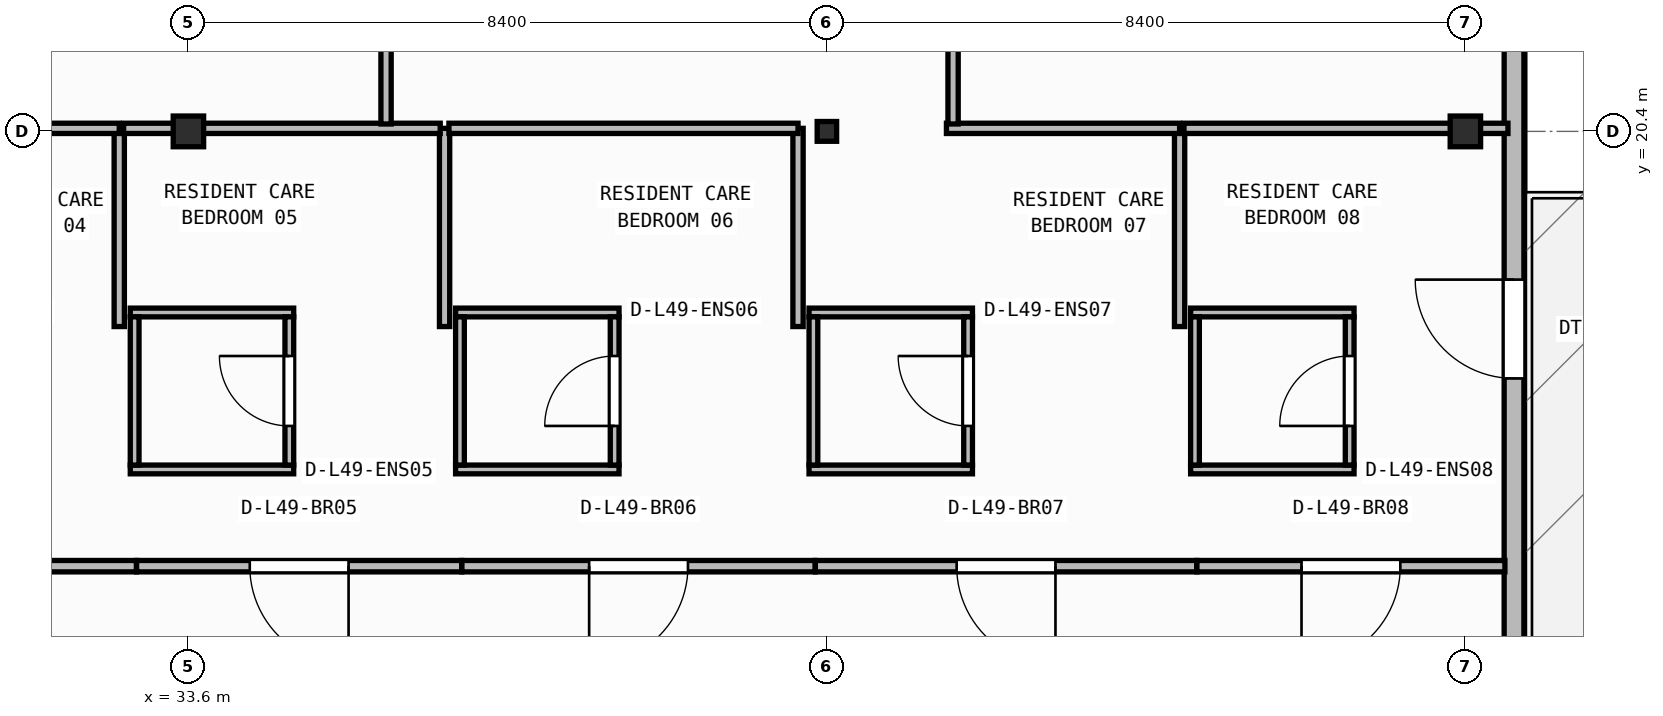
"""IFC4 building model, lengths in metres.
Left out: names, types, materials, properties, quantities, classifications, styles, units other than length and angle.
Written with IfcOpenShell. Run it as: python <this file> out.ifc"""

import sys

from ifc_helpers import new_model, si_unit, direction, frame, frame_2d, origin, origin_2d, place, context, subcontext, project, spatial, rectangle, i_section, extrude, element, fill, save


model = new_model("IFC4")
c1 = context("Model", 3, precision=1e-05, world=origin(), true_north=direction((0.0, 1.0)))
c2 = subcontext(c1, "Body", "Model", "MODEL_VIEW")
j1 = project(units=[si_unit("LENGTHUNIT", "METRE"), si_unit("PLANEANGLEUNIT", "RADIAN")], contexts=[c1])
p1 = place(None, origin())
s1 = spatial("IfcSite", under=j1, at=p1, CompositionType="ELEMENT")
p2 = place(p1, origin())
s2 = spatial("IfcBuilding", under=s1, at=p2, CompositionType="ELEMENT")
p3 = place(p2, frame((0.0, 0.0, 200.0)))
s3 = spatial("IfcBuildingStorey", under=s2, at=p3, CompositionType="ELEMENT", Elevation=200.0)
p4 = place(p3, frame((33.6, 20.4, 0.0), z_axis=(0.0, 0.0, 1.0), x_axis=(1.0, 0.0, 0.0)))
e1 = element("IfcColumn", 1, at=p4, inside=s3, PredefinedType="COLUMN", context=c2, shape_type="SweptSolid", body=[
    extrude(i_section(OverallWidth=0.4, OverallDepth=0.404, WebThickness=0.02, FlangeThickness=0.032, at=origin_2d()), origin(), (0.0, 0.0, 1.0), 3.95),
])
p5 = place(p3, frame((42.0, 20.4, 0.0), z_axis=(0.0, 0.0, 1.0), x_axis=(1.0, 0.0, 0.0)))
e2 = element("IfcColumn", 2, at=p5, inside=s3, PredefinedType="COLUMN", context=c2, shape_type="SweptSolid", body=[
    extrude(i_section(OverallWidth=0.256, OverallDepth=0.26, WebThickness=0.01, FlangeThickness=0.017, FilletRadius=0.013, at=origin_2d()), origin(), (0.0, 0.0, 1.0), 3.95),
])
p6 = place(p3, frame((50.4, 20.4, 0.0), z_axis=(0.0, 0.0, 1.0), x_axis=(1.0, 0.0, 0.0)))
e3 = element("IfcColumn", 3, at=p6, inside=s3, PredefinedType="COLUMN", context=c2, shape_type="SweptSolid", body=[
    extrude(i_section(OverallWidth=0.4, OverallDepth=0.404, WebThickness=0.02, FlangeThickness=0.032, at=origin_2d()), origin(), (0.0, 0.0, 1.0), 3.95),
])
p7 = place(p3, frame((51.04, 6.46, 0.0), z_axis=(0.0, 0.0, 1.0), x_axis=(0.0, 1.0, 0.0)))
e4 = element("IfcWall", 4, at=p7, inside=s3, PredefinedType="STANDARD", context=c2, shape_type="SweptSolid", body=[
    extrude(rectangle(XDim=22.68, YDim=0.26, at=frame_2d((11.34, 0.0))), origin(), (0.0, 0.0, 1.0), 3.71),
])
p8 = place(p7, frame((10.69, 0.0, 0.0)))
e5 = element("IfcOpeningElement", 5, at=p8, cuts=e4, PredefinedType="OPENING", context=c2, shape_type="SweptSolid", body=[
    extrude(rectangle(XDim=1.3, YDim=2.15, at=frame_2d((0.65, 1.075))), frame((0.0, 0.14, 0.0), z_axis=(0.0, -1.0, 0.0), x_axis=(1.0, 0.0, 0.0)), (0.0, 0.0, 1.0), 0.28),
])
p9 = place(p3, frame((32.835, 15.952, 0.0), z_axis=(0.0, 0.0, 1.0), x_axis=(1.0, 0.0, 0.0)))
e6 = element("IfcWall", 6, at=p9, inside=s3, PredefinedType="PARTITIONING", context=c2, shape_type="SweptSolid", body=[
    extrude(rectangle(XDim=2.15, YDim=0.115, at=frame_2d((1.075, 0.0))), origin(), (0.0, 0.0, 1.0), 3.429),
])
p10 = place(p3, frame((32.835, 18.018, 0.0), z_axis=(0.0, 0.0, 1.0), x_axis=(1.0, 0.0, 0.0)))
e7 = element("IfcWall", 7, at=p10, inside=s3, PredefinedType="PARTITIONING", context=c2, shape_type="SweptSolid", body=[
    extrude(rectangle(XDim=2.15, YDim=0.115, at=frame_2d((1.075, 0.0))), origin(), (0.0, 0.0, 1.0), 3.71),
])
p11 = place(p3, frame((32.893, 16.01, 0.0), z_axis=(0.0, 0.0, 1.0), x_axis=(0.0, 1.0, 0.0)))
e8 = element("IfcWall", 8, at=p11, inside=s3, PredefinedType="PARTITIONING", context=c2, shape_type="SweptSolid", body=[
    extrude(rectangle(XDim=1.95, YDim=0.115, at=frame_2d((0.975, 0.0))), origin(), (0.0, 0.0, 1.0), 3.71),
])
p12 = place(p3, frame((34.927, 16.01, 0.0), z_axis=(0.0, 0.0, 1.0), x_axis=(0.0, 1.0, 0.0)))
e9 = element("IfcWall", 9, at=p12, inside=s3, PredefinedType="PARTITIONING", context=c2, shape_type="SweptSolid", body=[
    extrude(rectangle(XDim=1.95, YDim=0.115, at=frame_2d((0.975, 0.0))), origin(), (0.0, 0.0, 1.0), 3.71),
])
p13 = place(p12, frame((0.515, 0.0, 0.0)))
e10 = element("IfcOpeningElement", 10, at=p13, cuts=e9, PredefinedType="OPENING", context=c2, shape_type="SweptSolid", body=[
    extrude(rectangle(XDim=0.92, YDim=2.1, at=frame_2d((0.46, 1.05))), frame((0.0, 0.067, 0.0), z_axis=(0.0, -1.0, 0.0), x_axis=(1.0, 0.0, 0.0)), (0.0, 0.0, 1.0), 0.135),
])
p14 = place(p3, frame((37.115, 15.952, 0.0), z_axis=(0.0, 0.0, 1.0), x_axis=(1.0, 0.0, 0.0)))
e11 = element("IfcWall", 11, at=p14, inside=s3, PredefinedType="PARTITIONING", context=c2, shape_type="SweptSolid", body=[
    extrude(rectangle(XDim=2.15, YDim=0.115, at=frame_2d((1.075, 0.0))), origin(), (0.0, 0.0, 1.0), 3.429),
])
p15 = place(p3, frame((37.115, 18.018, 0.0), z_axis=(0.0, 0.0, 1.0), x_axis=(1.0, 0.0, 0.0)))
e12 = element("IfcWall", 12, at=p15, inside=s3, PredefinedType="PARTITIONING", context=c2, shape_type="SweptSolid", body=[
    extrude(rectangle(XDim=2.15, YDim=0.115, at=frame_2d((1.075, 0.0))), origin(), (0.0, 0.0, 1.0), 3.71),
])
p16 = place(p3, frame((37.173, 16.01, 0.0), z_axis=(0.0, 0.0, 1.0), x_axis=(0.0, 1.0, 0.0)))
e13 = element("IfcWall", 13, at=p16, inside=s3, PredefinedType="PARTITIONING", context=c2, shape_type="SweptSolid", body=[
    extrude(rectangle(XDim=1.95, YDim=0.115, at=frame_2d((0.975, 0.0))), origin(), (0.0, 0.0, 1.0), 3.71),
])
p17 = place(p3, frame((39.208, 16.01, 0.0), z_axis=(0.0, 0.0, 1.0), x_axis=(0.0, 1.0, 0.0)))
e14 = element("IfcWall", 14, at=p17, inside=s3, PredefinedType="PARTITIONING", context=c2, shape_type="SweptSolid", body=[
    extrude(rectangle(XDim=1.95, YDim=0.115, at=frame_2d((0.975, 0.0))), origin(), (0.0, 0.0, 1.0), 3.71),
])
p18 = place(p17, frame((0.515, 0.0, 0.0)))
e15 = element("IfcOpeningElement", 15, at=p18, cuts=e14, PredefinedType="OPENING", context=c2, shape_type="SweptSolid", body=[
    extrude(rectangle(XDim=0.92, YDim=2.1, at=frame_2d((0.46, 1.05))), frame((0.0, 0.067, 0.0), z_axis=(0.0, -1.0, 0.0), x_axis=(1.0, 0.0, 0.0)), (0.0, 0.0, 1.0), 0.135),
])
p19 = place(p3, frame((41.765, 15.952, 0.0), z_axis=(0.0, 0.0, 1.0), x_axis=(1.0, 0.0, 0.0)))
e16 = element("IfcWall", 16, at=p19, inside=s3, PredefinedType="PARTITIONING", context=c2, shape_type="SweptSolid", body=[
    extrude(rectangle(XDim=2.15, YDim=0.115, at=frame_2d((1.075, 0.0))), origin(), (0.0, 0.0, 1.0), 3.429),
])
p20 = place(p3, frame((41.765, 18.018, 0.0), z_axis=(0.0, 0.0, 1.0), x_axis=(1.0, 0.0, 0.0)))
e17 = element("IfcWall", 17, at=p20, inside=s3, PredefinedType="PARTITIONING", context=c2, shape_type="SweptSolid", body=[
    extrude(rectangle(XDim=2.15, YDim=0.115, at=frame_2d((1.075, 0.0))), origin(), (0.0, 0.0, 1.0), 3.71),
])
p21 = place(p3, frame((41.823, 16.01, 0.0), z_axis=(0.0, 0.0, 1.0), x_axis=(0.0, 1.0, 0.0)))
e18 = element("IfcWall", 18, at=p21, inside=s3, PredefinedType="PARTITIONING", context=c2, shape_type="SweptSolid", body=[
    extrude(rectangle(XDim=1.95, YDim=0.115, at=frame_2d((0.975, 0.0))), origin(), (0.0, 0.0, 1.0), 3.157),
])
p22 = place(p3, frame((43.857, 16.01, 0.0), z_axis=(0.0, 0.0, 1.0), x_axis=(0.0, 1.0, 0.0)))
e19 = element("IfcWall", 19, at=p22, inside=s3, PredefinedType="PARTITIONING", context=c2, shape_type="SweptSolid", body=[
    extrude(rectangle(XDim=1.95, YDim=0.115, at=frame_2d((0.975, 0.0))), origin(), (0.0, 0.0, 1.0), 3.71),
])
p23 = place(p22, frame((0.515, 0.0, 0.0)))
e20 = element("IfcOpeningElement", 20, at=p23, cuts=e19, PredefinedType="OPENING", context=c2, shape_type="SweptSolid", body=[
    extrude(rectangle(XDim=0.92, YDim=2.1, at=frame_2d((0.46, 1.05))), frame((0.0, 0.067, 0.0), z_axis=(0.0, -1.0, 0.0), x_axis=(1.0, 0.0, 0.0)), (0.0, 0.0, 1.0), 0.135),
])
p24 = place(p3, frame((46.785, 15.952, 0.0), z_axis=(0.0, 0.0, 1.0), x_axis=(1.0, 0.0, 0.0)))
e21 = element("IfcWall", 21, at=p24, inside=s3, PredefinedType="PARTITIONING", context=c2, shape_type="SweptSolid", body=[
    extrude(rectangle(XDim=2.15, YDim=0.115, at=frame_2d((1.075, 0.0))), origin(), (0.0, 0.0, 1.0), 3.429),
])
p25 = place(p3, frame((46.785, 18.018, 0.0), z_axis=(0.0, 0.0, 1.0), x_axis=(1.0, 0.0, 0.0)))
e22 = element("IfcWall", 22, at=p25, inside=s3, PredefinedType="PARTITIONING", context=c2, shape_type="SweptSolid", body=[
    extrude(rectangle(XDim=2.15, YDim=0.115, at=frame_2d((1.075, 0.0))), origin(), (0.0, 0.0, 1.0), 3.71),
])
p26 = place(p3, frame((46.843, 16.01, 0.0), z_axis=(0.0, 0.0, 1.0), x_axis=(0.0, 1.0, 0.0)))
e23 = element("IfcWall", 23, at=p26, inside=s3, PredefinedType="PARTITIONING", context=c2, shape_type="SweptSolid", body=[
    extrude(rectangle(XDim=1.95, YDim=0.115, at=frame_2d((0.975, 0.0))), origin(), (0.0, 0.0, 1.0), 3.71),
])
p27 = place(p3, frame((48.877, 16.01, 0.0), z_axis=(0.0, 0.0, 1.0), x_axis=(0.0, 1.0, 0.0)))
e24 = element("IfcWall", 24, at=p27, inside=s3, PredefinedType="PARTITIONING", context=c2, shape_type="SweptSolid", body=[
    extrude(rectangle(XDim=1.95, YDim=0.115, at=frame_2d((0.975, 0.0))), origin(), (0.0, 0.0, 1.0), 3.71),
])
p28 = place(p27, frame((0.515, 0.0, 0.0)))
e25 = element("IfcOpeningElement", 25, at=p28, cuts=e24, PredefinedType="OPENING", context=c2, shape_type="SweptSolid", body=[
    extrude(rectangle(XDim=0.92, YDim=2.1, at=frame_2d((0.46, 1.05))), frame((0.0, 0.067, 0.0), z_axis=(0.0, -1.0, 0.0), x_axis=(1.0, 0.0, 0.0)), (0.0, 0.0, 1.0), 0.135),
])
p29 = place(p3, frame((32.916, 14.68, 0.0), z_axis=(0.0, 0.0, 1.0), x_axis=(-1.0, 0.0, 0.0)))
e26 = element("IfcWall", 26, at=p29, inside=s3, PredefinedType="PARTITIONING", context=c2, shape_type="SweptSolid", body=[
    extrude(rectangle(XDim=5.018, YDim=0.15, at=frame_2d((2.509, 0.0))), origin(), (0.0, 0.0, 1.0), 3.71),
])
p30 = place(p29, frame((1.859, 0.0, 0.0)))
e27 = element("IfcOpeningElement", 27, at=p30, cuts=e26, PredefinedType="OPENING", context=c2, shape_type="SweptSolid", body=[
    extrude(rectangle(XDim=1.3, YDim=2.15, at=frame_2d((0.65, 1.075))), frame((0.0, 0.085, 0.0), z_axis=(0.0, -1.0, 0.0), x_axis=(1.0, 0.0, 0.0)), (0.0, 0.0, 1.0), 0.17),
])
p31 = place(p3, frame((37.196, 14.68, 0.0), z_axis=(0.0, 0.0, 1.0), x_axis=(-1.0, 0.0, 0.0)))
e28 = element("IfcWall", 28, at=p31, inside=s3, PredefinedType="PARTITIONING", context=c2, shape_type="SweptSolid", body=[
    extrude(rectangle(XDim=4.278, YDim=0.15, at=frame_2d((2.139, 0.0))), origin(), (0.0, 0.0, 1.0), 3.71),
])
p32 = place(p31, frame((1.489, 0.0, 0.0)))
e29 = element("IfcOpeningElement", 29, at=p32, cuts=e28, PredefinedType="OPENING", context=c2, shape_type="SweptSolid", body=[
    extrude(rectangle(XDim=1.3, YDim=2.15, at=frame_2d((0.65, 1.075))), frame((0.0, 0.085, 0.0), z_axis=(0.0, -1.0, 0.0), x_axis=(1.0, 0.0, 0.0)), (0.0, 0.0, 1.0), 0.17),
])
p33 = place(p3, frame((41.846, 14.68, 0.0), z_axis=(0.0, 0.0, 1.0), x_axis=(-1.0, 0.0, 0.0)))
e30 = element("IfcWall", 30, at=p33, inside=s3, PredefinedType="PARTITIONING", context=c2, shape_type="SweptSolid", body=[
    extrude(rectangle(XDim=4.648, YDim=0.15, at=frame_2d((2.324, 0.0))), origin(), (0.0, 0.0, 1.0), 3.71),
])
p34 = place(p33, frame((1.674, 0.0, 0.0)))
e31 = element("IfcOpeningElement", 31, at=p34, cuts=e30, PredefinedType="OPENING", context=c2, shape_type="SweptSolid", body=[
    extrude(rectangle(XDim=1.3, YDim=2.15, at=frame_2d((0.65, 1.075))), frame((0.0, 0.085, 0.0), z_axis=(0.0, -1.0, 0.0), x_axis=(1.0, 0.0, 0.0)), (0.0, 0.0, 1.0), 0.17),
])
p35 = place(p3, frame((46.866, 14.68, 0.0), z_axis=(0.0, 0.0, 1.0), x_axis=(-1.0, 0.0, 0.0)))
e32 = element("IfcWall", 32, at=p35, inside=s3, PredefinedType="PARTITIONING", context=c2, shape_type="SweptSolid", body=[
    extrude(rectangle(XDim=5.018, YDim=0.15, at=frame_2d((2.509, 0.0))), origin(), (0.0, 0.0, 1.0), 3.71),
])
p36 = place(p35, frame((1.859, 0.0, 0.0)))
e33 = element("IfcOpeningElement", 33, at=p36, cuts=e32, PredefinedType="OPENING", context=c2, shape_type="SweptSolid", body=[
    extrude(rectangle(XDim=1.3, YDim=2.15, at=frame_2d((0.65, 1.075))), frame((0.0, 0.085, 0.0), z_axis=(0.0, -1.0, 0.0), x_axis=(1.0, 0.0, 0.0)), (0.0, 0.0, 1.0), 0.17),
])
p37 = place(p3, frame((50.92, 14.68, 0.0), z_axis=(0.0, 0.0, 1.0), x_axis=(-1.0, 0.0, 0.0)))
e34 = element("IfcWall", 34, at=p37, inside=s3, PredefinedType="PARTITIONING", context=c2, shape_type="SweptSolid", body=[
    extrude(rectangle(XDim=4.052, YDim=0.15, at=frame_2d((2.026, 0.0))), origin(), (0.0, 0.0, 1.0), 3.71),
])
p38 = place(p37, frame((1.376, 0.0, 0.0)))
e35 = element("IfcOpeningElement", 35, at=p38, cuts=e34, PredefinedType="OPENING", context=c2, shape_type="SweptSolid", body=[
    extrude(rectangle(XDim=1.3, YDim=2.15, at=frame_2d((0.65, 1.075))), frame((0.0, 0.085, 0.0), z_axis=(0.0, -1.0, 0.0), x_axis=(1.0, 0.0, 0.0)), (0.0, 0.0, 1.0), 0.17),
])
p39 = place(p3, frame((32.69, 17.833, 0.0), z_axis=(0.0, 0.0, 1.0), x_axis=(0.0, 1.0, 0.0)))
e36 = element("IfcWall", 36, at=p39, inside=s3, PredefinedType="PARTITIONING", context=c2, shape_type="SweptSolid", body=[
    extrude(rectangle(XDim=2.607, YDim=0.135, at=frame_2d((1.304, 0.0))), origin(), (0.0, 0.0, 1.0), 3.71),
])
p40 = place(p3, frame((32.69, 20.44, 0.0), z_axis=(0.0, 0.0, 1.0), x_axis=(-1.0, 0.0, 0.0)))
e37 = element("IfcWall", 37, at=p40, inside=s3, PredefinedType="PARTITIONING", context=c2, shape_type="SweptSolid", body=[
    extrude(rectangle(XDim=4.962, YDim=0.135, at=frame_2d((2.481, 0.0))), origin(), (0.0, 0.0, 1.0), 3.152),
])
p41 = place(p3, frame((36.97, 17.833, 0.0), z_axis=(0.0, 0.0, 1.0), x_axis=(0.0, 1.0, 0.0)))
e38 = element("IfcWall", 38, at=p41, inside=s3, PredefinedType="PARTITIONING", context=c2, shape_type="SweptSolid", body=[
    extrude(rectangle(XDim=2.607, YDim=0.135, at=frame_2d((1.304, 0.0))), origin(), (0.0, 0.0, 1.0), 3.71),
])
p42 = place(p3, frame((36.913, 20.44, 0.0), z_axis=(0.0, 0.0, 1.0), x_axis=(-1.0, 0.0, 0.0)))
e39 = element("IfcWall", 39, at=p42, inside=s3, PredefinedType="PARTITIONING", context=c2, shape_type="SweptSolid", body=[
    extrude(rectangle(XDim=4.165, YDim=0.135, at=frame_2d((2.083, 0.0))), origin(), (0.0, 0.0, 1.0), 3.152),
])
p43 = place(p3, frame((41.62, 17.833, 0.0), z_axis=(0.0, 0.0, 1.0), x_axis=(0.0, 1.0, 0.0)))
e40 = element("IfcWall", 40, at=p43, inside=s3, PredefinedType="PARTITIONING", context=c2, shape_type="SweptSolid", body=[
    extrude(rectangle(XDim=2.607, YDim=0.135, at=frame_2d((1.304, 0.0))), origin(), (0.0, 0.0, 1.0), 3.157),
])
p44 = place(p3, frame((41.62, 20.44, 0.0), z_axis=(0.0, 0.0, 1.0), x_axis=(-1.0, 0.0, 0.0)))
e41 = element("IfcWall", 41, at=p44, inside=s3, PredefinedType="PARTITIONING", context=c2, shape_type="SweptSolid", body=[
    extrude(rectangle(XDim=4.593, YDim=0.135, at=frame_2d((2.296, 0.0))), origin(), (0.0, 0.0, 1.0), 3.152),
])
p45 = place(p3, frame((46.64, 17.833, 0.0), z_axis=(0.0, 0.0, 1.0), x_axis=(0.0, 1.0, 0.0)))
e42 = element("IfcWall", 42, at=p45, inside=s3, PredefinedType="PARTITIONING", context=c2, shape_type="SweptSolid", body=[
    extrude(rectangle(XDim=2.607, YDim=0.135, at=frame_2d((1.304, 0.0))), origin(), (0.0, 0.0, 1.0), 3.71),
])
p46 = place(p3, frame((46.64, 20.44, 0.0), z_axis=(0.0, 0.0, 1.0), x_axis=(-1.0, 0.0, 0.0)))
e43 = element("IfcWall", 43, at=p46, inside=s3, PredefinedType="PARTITIONING", context=c2, shape_type="SweptSolid", body=[
    extrude(rectangle(XDim=3.067, YDim=0.135, at=frame_2d((1.534, 0.0))), origin(), (0.0, 0.0, 1.0), 3.152),
])
p47 = place(p3, frame((50.96, 20.44, 0.0), z_axis=(0.0, 0.0, 1.0), x_axis=(-1.0, 0.0, 0.0)))
e44 = element("IfcWall", 44, at=p47, inside=s3, PredefinedType="PARTITIONING", context=c2, shape_type="SweptSolid", body=[
    extrude(rectangle(XDim=4.262, YDim=0.135, at=frame_2d((2.131, 0.0))), origin(), (0.0, 0.0, 1.0), 3.152),
])
p48 = place(p3, frame((36.2, 20.498, 0.0), z_axis=(0.0, 0.0, 1.0), x_axis=(0.0, 1.0, 0.0)))
e45 = element("IfcWall", 45, at=p48, inside=s3, PredefinedType="PARTITIONING", context=c2, shape_type="SweptSolid", body=[
    extrude(rectangle(XDim=6.642, YDim=0.135, at=frame_2d((3.321, 0.0))), origin(), (0.0, 0.0, 1.0), 3.71),
])
p49 = place(p48, frame((2.771, 0.0, 0.0)))
e46 = element("IfcOpeningElement", 46, at=p49, cuts=e45, PredefinedType="OPENING", context=c2, shape_type="SweptSolid", body=[
    extrude(rectangle(XDim=1.1, YDim=2.1, at=frame_2d((0.55, 1.05))), frame((0.0, 0.077, 0.0), z_axis=(0.0, -1.0, 0.0), x_axis=(1.0, 0.0, 0.0)), (0.0, 0.0, 1.0), 0.155),
])
p50 = place(p3, frame((43.66, 20.498, 0.0), z_axis=(0.0, 0.0, 1.0), x_axis=(0.0, 1.0, 0.0)))
e47 = element("IfcWall", 47, at=p50, inside=s3, PredefinedType="PARTITIONING", context=c2, shape_type="SweptSolid", body=[
    extrude(rectangle(XDim=6.642, YDim=0.135, at=frame_2d((3.321, 0.0))), origin(), (0.0, 0.0, 1.0), 3.71),
])
p51 = place(p50, frame((3.542, 0.0, 0.0)))
e48 = element("IfcOpeningElement", 48, at=p51, cuts=e47, PredefinedType="OPENING", context=c2, shape_type="SweptSolid", body=[
    extrude(rectangle(XDim=1.1, YDim=2.1, at=frame_2d((0.55, 1.05))), frame((0.0, 0.077, 0.0), z_axis=(0.0, -1.0, 0.0), x_axis=(1.0, 0.0, 0.0)), (0.0, 0.0, 1.0), 0.155),
])
p52 = place(p8, origin())
e49 = element("IfcDoor", 49, at=p52, inside=s3, OperationType="SINGLE_SWING_RIGHT", PredefinedType="DOOR", context=c2, shape_type="SweptSolid", body=[
    extrude(rectangle(XDim=1.3, YDim=2.15, at=frame_2d((0.65, 1.075))), frame((0.0, 0.025, 0.0), z_axis=(0.0, -1.0, 0.0), x_axis=(1.0, 0.0, 0.0)), (0.0, 0.0, 1.0), 0.05),
])
fill(e5, e49)
p53 = place(p13, origin())
e50 = element("IfcDoor", 50, at=p53, inside=s3, OperationType="SINGLE_SWING_RIGHT", PredefinedType="DOOR", context=c2, shape_type="SweptSolid", body=[
    extrude(rectangle(XDim=0.92, YDim=2.1, at=frame_2d((0.46, 1.05))), frame((0.0, 0.025, 0.0), z_axis=(0.0, -1.0, 0.0), x_axis=(1.0, 0.0, 0.0)), (0.0, 0.0, 1.0), 0.05),
])
fill(e10, e50)
p54 = place(p18, origin())
e51 = element("IfcDoor", 51, at=p54, inside=s3, OperationType="SINGLE_SWING_LEFT", PredefinedType="DOOR", context=c2, shape_type="SweptSolid", body=[
    extrude(rectangle(XDim=0.92, YDim=2.1, at=frame_2d((0.46, 1.05))), frame((0.0, 0.025, 0.0), z_axis=(0.0, -1.0, 0.0), x_axis=(1.0, 0.0, 0.0)), (0.0, 0.0, 1.0), 0.05),
])
fill(e15, e51)
p55 = place(p23, origin())
e52 = element("IfcDoor", 52, at=p55, inside=s3, OperationType="SINGLE_SWING_RIGHT", PredefinedType="DOOR", context=c2, shape_type="SweptSolid", body=[
    extrude(rectangle(XDim=0.92, YDim=2.1, at=frame_2d((0.46, 1.05))), frame((0.0, 0.025, 0.0), z_axis=(0.0, -1.0, 0.0), x_axis=(1.0, 0.0, 0.0)), (0.0, 0.0, 1.0), 0.05),
])
fill(e20, e52)
p56 = place(p28, origin())
e53 = element("IfcDoor", 53, at=p56, inside=s3, OperationType="SINGLE_SWING_LEFT", PredefinedType="DOOR", context=c2, shape_type="SweptSolid", body=[
    extrude(rectangle(XDim=0.92, YDim=2.1, at=frame_2d((0.46, 1.05))), frame((0.0, 0.025, 0.0), z_axis=(0.0, -1.0, 0.0), x_axis=(1.0, 0.0, 0.0)), (0.0, 0.0, 1.0), 0.05),
])
fill(e25, e53)
p57 = place(p32, origin())
e54 = element("IfcDoor", 54, at=p57, inside=s3, OperationType="SINGLE_SWING_LEFT", PredefinedType="DOOR", context=c2, shape_type="SweptSolid", body=[
    extrude(rectangle(XDim=1.3, YDim=2.15, at=frame_2d((0.65, 1.075))), frame((0.0, 0.025, 0.0), z_axis=(0.0, -1.0, 0.0), x_axis=(1.0, 0.0, 0.0)), (0.0, 0.0, 1.0), 0.05),
])
fill(e29, e54)
p58 = place(p34, origin())
e55 = element("IfcDoor", 55, at=p58, inside=s3, OperationType="SINGLE_SWING_RIGHT", PredefinedType="DOOR", context=c2, shape_type="SweptSolid", body=[
    extrude(rectangle(XDim=1.3, YDim=2.15, at=frame_2d((0.65, 1.075))), frame((0.0, 0.025, 0.0), z_axis=(0.0, -1.0, 0.0), x_axis=(1.0, 0.0, 0.0)), (0.0, 0.0, 1.0), 0.05),
])
fill(e31, e55)
p59 = place(p36, origin())
e56 = element("IfcDoor", 56, at=p59, inside=s3, OperationType="SINGLE_SWING_LEFT", PredefinedType="DOOR", context=c2, shape_type="SweptSolid", body=[
    extrude(rectangle(XDim=1.3, YDim=2.15, at=frame_2d((0.65, 1.075))), frame((0.0, 0.025, 0.0), z_axis=(0.0, -1.0, 0.0), x_axis=(1.0, 0.0, 0.0)), (0.0, 0.0, 1.0), 0.05),
])
fill(e33, e56)
p60 = place(p38, origin())
e57 = element("IfcDoor", 57, at=p60, inside=s3, OperationType="SINGLE_SWING_RIGHT", PredefinedType="DOOR", context=c2, shape_type="SweptSolid", body=[
    extrude(rectangle(XDim=1.3, YDim=2.15, at=frame_2d((0.65, 1.075))), frame((0.0, 0.025, 0.0), z_axis=(0.0, -1.0, 0.0), x_axis=(1.0, 0.0, 0.0)), (0.0, 0.0, 1.0), 0.05),
])
fill(e35, e57)
save(model, sys.argv[1])
